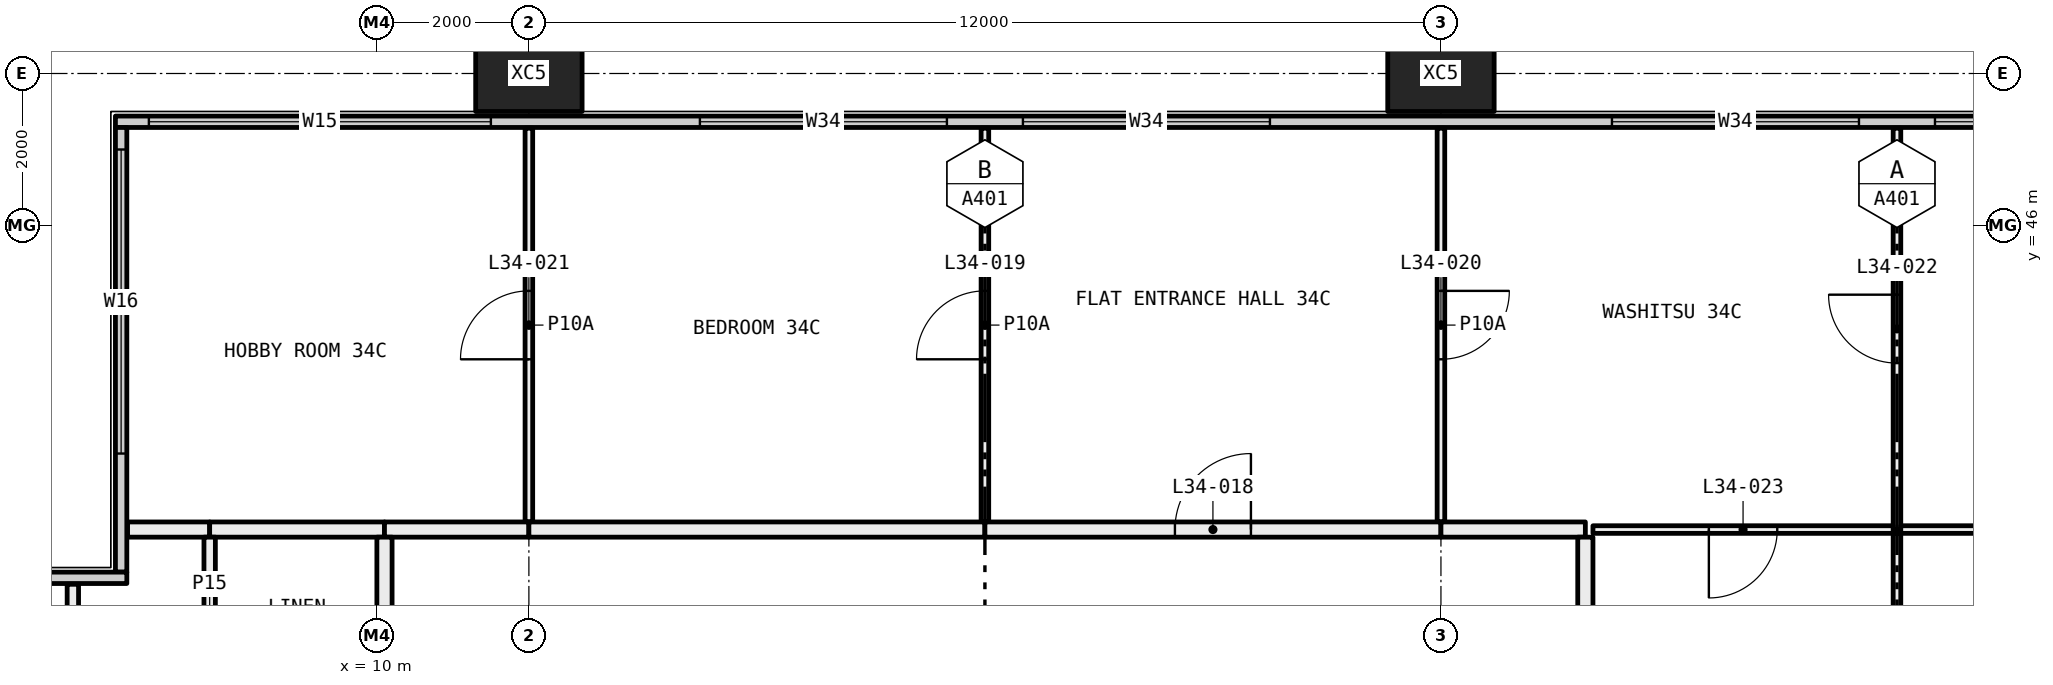
"""IFC4 building model, lengths in metres.
Left out: names, types, materials, properties, quantities, classifications, styles, units other than length and angle.
Written with IfcOpenShell. Run it as: python <this file> out.ifc"""

import sys

from ifc_helpers import new_model, si_unit, direction, frame, frame_2d, origin, origin_2d, place, context, subcontext, project, spatial, rectangle, hollow_rectangle, extrude, element, fill, save


model = new_model("IFC4")
c1 = context("Model", 3, precision=1e-05, world=origin(), true_north=direction((0.0, 1.0)))
c2 = subcontext(c1, "Body", "Model", "MODEL_VIEW")
j1 = project(units=[si_unit("LENGTHUNIT", "METRE"), si_unit("PLANEANGLEUNIT", "RADIAN")], contexts=[c1])
p1 = place(None, origin())
s1 = spatial("IfcSite", under=j1, at=p1, CompositionType="ELEMENT")
p2 = place(p1, origin())
s2 = spatial("IfcBuilding", under=s1, at=p2, CompositionType="ELEMENT")
p3 = place(p2, frame((0.0, 0.0, 131.1)))
s3 = spatial("IfcBuildingStorey", under=s2, at=p3, CompositionType="ELEMENT", Elevation=131.1)
for number, where, z_axis, x_axis in (
    (1, (12.0, 48.0, -0.4), (0.0, 0.0, 1.0), (1.0, 0.0, 0.0)),
    (2, (24.0, 48.0, -0.4), (0.0, 0.0, 1.0), (1.0, 0.0, 0.0)),
):
    element("IfcColumn", number, at=place(p3, frame(where, z_axis=z_axis, x_axis=x_axis)), inside=s3, PredefinedType="COLUMN", context=c2, shape_type="SweptSolid", body=[
        extrude(hollow_rectangle(XDim=1.4, YDim=1.0, WallThickness=0.055, at=origin_2d()), origin(), (0.0, 0.0, 1.0), 3.45),
    ])
p4 = place(p3, frame((6.56, 47.365, 0.0), z_axis=(0.0, 0.0, 1.0), x_axis=(1.0, 0.0, 0.0)))
e3 = element("IfcWall", 3, at=p4, inside=s3, PredefinedType="ELEMENTEDWALL", context=c2, shape_type="SweptSolid", body=[
    extrude(rectangle(XDim=58.88, YDim=0.15, at=frame_2d((29.44, 0.0))), origin(), (0.0, 0.0, 1.0), 3.05),
])
p5 = place(p4, frame((0.44, 0.0, 0.45)))
e4 = element("IfcOpeningElement", 4, at=p5, cuts=e3, PredefinedType="OPENING", context=c2, shape_type="SweptSolid", body=[
    extrude(rectangle(XDim=4.5, YDim=2.55, at=frame_2d((2.25, 1.275))), frame((0.0, 0.085, 0.0), z_axis=(0.0, -1.0, 0.0), x_axis=(1.0, 0.0, 0.0)), (0.0, 0.0, 1.0), 0.17),
])
p6 = place(p4, frame((7.69, 0.0, 0.45)))
e5 = element("IfcOpeningElement", 5, at=p6, cuts=e3, PredefinedType="OPENING", context=c2, shape_type="SweptSolid", body=[
    extrude(rectangle(XDim=3.25, YDim=2.55, at=frame_2d((1.625, 1.275))), frame((0.0, 0.085, 0.0), z_axis=(0.0, -1.0, 0.0), x_axis=(1.0, 0.0, 0.0)), (0.0, 0.0, 1.0), 0.17),
])
p7 = place(p4, frame((11.94, 0.0, 0.45)))
e6 = element("IfcOpeningElement", 6, at=p7, cuts=e3, PredefinedType="OPENING", context=c2, shape_type="SweptSolid", body=[
    extrude(rectangle(XDim=3.25, YDim=2.55, at=frame_2d((1.625, 1.275))), frame((0.0, 0.085, 0.0), z_axis=(0.0, -1.0, 0.0), x_axis=(1.0, 0.0, 0.0)), (0.0, 0.0, 1.0), 0.17),
])
p8 = place(p4, frame((19.69, 0.0, 0.45)))
e7 = element("IfcOpeningElement", 7, at=p8, cuts=e3, PredefinedType="OPENING", context=c2, shape_type="SweptSolid", body=[
    extrude(rectangle(XDim=3.25, YDim=2.55, at=frame_2d((1.625, 1.275))), frame((0.0, 0.085, 0.0), z_axis=(0.0, -1.0, 0.0), x_axis=(1.0, 0.0, 0.0)), (0.0, 0.0, 1.0), 0.17),
])
p9 = place(p4, frame((23.94, 0.0, 0.45)))
e8 = element("IfcOpeningElement", 8, at=p9, cuts=e3, PredefinedType="OPENING", context=c2, shape_type="SweptSolid", body=[
    extrude(rectangle(XDim=2.0, YDim=2.55, at=frame_2d((1.0, 1.275))), frame((0.0, 0.085, 0.0), z_axis=(0.0, -1.0, 0.0), x_axis=(1.0, 0.0, 0.0)), (0.0, 0.0, 1.0), 0.17),
])
p10 = place(p4, frame((31.69, 0.0, 0.45)))
e9 = element("IfcOpeningElement", 9, at=p10, cuts=e3, PredefinedType="OPENING", context=c2, shape_type="SweptSolid", body=[
    extrude(rectangle(XDim=3.25, YDim=2.55, at=frame_2d((1.625, 1.275))), frame((0.0, 0.085, 0.0), z_axis=(0.0, -1.0, 0.0), x_axis=(1.0, 0.0, 0.0)), (0.0, 0.0, 1.0), 0.17),
])
p11 = place(p4, frame((35.94, 0.0, 0.45)))
e10 = element("IfcOpeningElement", 10, at=p11, cuts=e3, PredefinedType="OPENING", context=c2, shape_type="SweptSolid", body=[
    extrude(rectangle(XDim=3.25, YDim=2.55, at=frame_2d((1.625, 1.275))), frame((0.0, 0.085, 0.0), z_axis=(0.0, -1.0, 0.0), x_axis=(1.0, 0.0, 0.0)), (0.0, 0.0, 1.0), 0.17),
])
p12 = place(p4, frame((43.69, 0.0, 0.45)))
e11 = element("IfcOpeningElement", 11, at=p12, cuts=e3, PredefinedType="OPENING", context=c2, shape_type="SweptSolid", body=[
    extrude(rectangle(XDim=3.25, YDim=2.55, at=frame_2d((1.625, 1.275))), frame((0.0, 0.085, 0.0), z_axis=(0.0, -1.0, 0.0), x_axis=(1.0, 0.0, 0.0)), (0.0, 0.0, 1.0), 0.17),
])
p13 = place(p4, frame((47.94, 0.0, 0.45)))
e12 = element("IfcOpeningElement", 12, at=p13, cuts=e3, PredefinedType="OPENING", context=c2, shape_type="SweptSolid", body=[
    extrude(rectangle(XDim=2.0, YDim=2.55, at=frame_2d((1.0, 1.275))), frame((0.0, 0.085, 0.0), z_axis=(0.0, -1.0, 0.0), x_axis=(1.0, 0.0, 0.0)), (0.0, 0.0, 1.0), 0.17),
])
p14 = place(p4, frame((53.94, 0.0, 0.45)))
e13 = element("IfcOpeningElement", 13, at=p14, cuts=e3, PredefinedType="OPENING", context=c2, shape_type="SweptSolid", body=[
    extrude(rectangle(XDim=4.5, YDim=2.55, at=frame_2d((2.25, 1.275))), frame((0.0, 0.085, 0.0), z_axis=(0.0, -1.0, 0.0), x_axis=(1.0, 0.0, 0.0)), (0.0, 0.0, 1.0), 0.17),
])
p15 = place(p3, frame((6.635, 41.44, 0.0), z_axis=(0.0, 0.0, 1.0), x_axis=(0.0, 1.0, 0.0)))
e14 = element("IfcWall", 14, at=p15, inside=s3, PredefinedType="ELEMENTEDWALL", context=c2, shape_type="SweptSolid", body=[
    extrude(rectangle(XDim=5.85, YDim=0.15, at=frame_2d((2.925, 0.0))), origin(), (0.0, 0.0, 1.0), 3.05),
])
p16 = place(p15, frame((1.56, 0.0, 0.45)))
e15 = element("IfcOpeningElement", 15, at=p16, cuts=e14, PredefinedType="OPENING", context=c2, shape_type="SweptSolid", body=[
    extrude(rectangle(XDim=4.0, YDim=2.55, at=frame_2d((2.0, 1.275))), frame((0.0, 0.085, 0.0), z_axis=(0.0, -1.0, 0.0), x_axis=(1.0, 0.0, 0.0)), (0.0, 0.0, 1.0), 0.17),
])
p17 = place(p3, frame((0.56, 41.365, 0.0), z_axis=(0.0, 0.0, 1.0), x_axis=(1.0, 0.0, 0.0)))
e16 = element("IfcWall", 16, at=p17, inside=s3, PredefinedType="ELEMENTEDWALL", context=c2, shape_type="SweptSolid", body=[
    extrude(rectangle(XDim=6.15, YDim=0.15, at=frame_2d((3.075, 0.0))), origin(), (0.0, 0.0, 1.0), 3.05),
])
p18 = place(p17, frame((0.44, 0.0, 0.45)))
e17 = element("IfcOpeningElement", 17, at=p18, cuts=e16, PredefinedType="OPENING", context=c2, shape_type="SweptSolid", body=[
    extrude(rectangle(XDim=4.0, YDim=2.55, at=frame_2d((2.0, 1.275))), frame((0.0, 0.085, 0.0), z_axis=(0.0, -1.0, 0.0), x_axis=(1.0, 0.0, 0.0)), (0.0, 0.0, 1.0), 0.17),
])
p19 = place(p3, frame((12.0, 42.1, 0.0), z_axis=(0.0, 0.0, 1.0), x_axis=(0.0, 1.0, 0.0)))
e18 = element("IfcWall", 18, at=p19, inside=s3, PredefinedType="PARTITIONING", context=c2, shape_type="SweptSolid", body=[
    extrude(rectangle(XDim=5.18, YDim=0.1, at=frame_2d((2.59, 0.0))), origin(), (0.0, 0.0, 1.0), 3.05),
])
p20 = place(p19, frame((2.14, 0.0, 0.0)))
e19 = element("IfcOpeningElement", 19, at=p20, cuts=e18, PredefinedType="OPENING", context=c2, shape_type="SweptSolid", body=[
    extrude(rectangle(XDim=0.9, YDim=2.1, at=frame_2d((0.45, 1.05))), frame((0.0, 0.06, 0.0), z_axis=(0.0, -1.0, 0.0), x_axis=(1.0, 0.0, 0.0)), (0.0, 0.0, 1.0), 0.12),
])
p21 = place(p3, frame((6.72, 42.0, 0.0), z_axis=(0.0, 0.0, 1.0), x_axis=(1.0, 0.0, 0.0)))
e20 = element("IfcWall", 20, at=p21, inside=s3, PredefinedType="PARTITIONING", context=c2, shape_type="SweptSolid", body=[
    extrude(rectangle(XDim=1.08, YDim=0.2, at=frame_2d((0.54, 0.0))), origin(), (0.0, 0.0, 1.0), 3.05),
])
p22 = place(p3, frame((7.8, 42.0, 0.0), z_axis=(0.0, 0.0, 1.0), x_axis=(1.0, 0.0, 0.0)))
e21 = element("IfcWall", 21, at=p22, inside=s3, PredefinedType="PARTITIONING", context=c2, shape_type="SweptSolid", body=[
    extrude(rectangle(XDim=2.3, YDim=0.2, at=frame_2d((1.15, 0.0))), origin(), (0.0, 0.0, 1.0), 3.05),
])
p23 = place(p3, frame((10.1, 42.0, 0.0), z_axis=(0.0, 0.0, 1.0), x_axis=(1.0, 0.0, 0.0)))
e22 = element("IfcWall", 22, at=p23, inside=s3, PredefinedType="PARTITIONING", context=c2, shape_type="SweptSolid", body=[
    extrude(rectangle(XDim=1.9, YDim=0.2, at=frame_2d((0.95, 0.0))), origin(), (0.0, 0.0, 1.0), 3.05),
])
p24 = place(p3, frame((18.0, 42.1, 0.0), z_axis=(0.0, 0.0, 1.0), x_axis=(0.0, 1.0, 0.0)))
e23 = element("IfcWall", 23, at=p24, inside=s3, PredefinedType="PARTITIONING", context=c2, shape_type="SweptSolid", body=[
    extrude(rectangle(XDim=5.18, YDim=0.1, at=frame_2d((2.59, 0.0))), origin(), (0.0, 0.0, 1.0), 3.05),
])
p25 = place(p24, frame((2.14, 0.0, 0.0)))
e24 = element("IfcOpeningElement", 24, at=p25, cuts=e23, PredefinedType="OPENING", context=c2, shape_type="SweptSolid", body=[
    extrude(rectangle(XDim=0.9, YDim=2.1, at=frame_2d((0.45, 1.05))), frame((0.0, 0.06, 0.0), z_axis=(0.0, -1.0, 0.0), x_axis=(1.0, 0.0, 0.0)), (0.0, 0.0, 1.0), 0.12),
])
p26 = place(p3, frame((12.0, 42.0, 0.0), z_axis=(0.0, 0.0, 1.0), x_axis=(1.0, 0.0, 0.0)))
e25 = element("IfcWall", 25, at=p26, inside=s3, PredefinedType="PARTITIONING", context=c2, shape_type="SweptSolid", body=[
    extrude(rectangle(XDim=6.0, YDim=0.2, at=frame_2d((3.0, 0.0))), origin(), (0.0, 0.0, 1.0), 3.05),
])
p27 = place(p3, frame((24.0, 42.1, 0.0), z_axis=(0.0, 0.0, 1.0), x_axis=(0.0, 1.0, 0.0)))
e26 = element("IfcWall", 26, at=p27, inside=s3, PredefinedType="PARTITIONING", context=c2, shape_type="SweptSolid", body=[
    extrude(rectangle(XDim=5.18, YDim=0.1, at=frame_2d((2.59, 0.0))), origin(), (0.0, 0.0, 1.0), 3.05),
])
p28 = place(p27, frame((2.14, 0.0, 0.0)))
e27 = element("IfcOpeningElement", 27, at=p28, cuts=e26, PredefinedType="OPENING", context=c2, shape_type="SweptSolid", body=[
    extrude(rectangle(XDim=0.9, YDim=2.1, at=frame_2d((0.45, 1.05))), frame((0.0, 0.06, 0.0), z_axis=(0.0, -1.0, 0.0), x_axis=(1.0, 0.0, 0.0)), (0.0, 0.0, 1.0), 0.12),
])
p29 = place(p3, frame((18.0, 42.0, 0.0), z_axis=(0.0, 0.0, 1.0), x_axis=(1.0, 0.0, 0.0)))
e28 = element("IfcWall", 28, at=p29, inside=s3, PredefinedType="PARTITIONING", context=c2, shape_type="SweptSolid", body=[
    extrude(rectangle(XDim=6.0, YDim=0.2, at=frame_2d((3.0, 0.0))), origin(), (0.0, 0.0, 1.0), 3.05),
])
p30 = place(p29, frame((2.5, 0.0, 0.0)))
e29 = element("IfcOpeningElement", 29, at=p30, cuts=e28, PredefinedType="OPENING", context=c2, shape_type="SweptSolid", body=[
    extrude(rectangle(XDim=1.0, YDim=2.1, at=frame_2d((0.5, 1.05))), frame((0.0, 0.11, 0.0), z_axis=(0.0, -1.0, 0.0), x_axis=(1.0, 0.0, 0.0)), (0.0, 0.0, 1.0), 0.22),
])
p31 = place(p3, frame((30.0, 42.0, 0.0), z_axis=(0.0, 0.0, 1.0), x_axis=(0.0, 1.0, 0.0)))
e30 = element("IfcWall", 30, at=p31, inside=s3, PredefinedType="PARTITIONING", context=c2, shape_type="SweptSolid", body=[
    extrude(rectangle(XDim=5.28, YDim=0.1, at=frame_2d((2.64, 0.0))), origin(), (0.0, 0.0, 1.0), 3.05),
])
p32 = place(p31, frame((2.19, 0.0, 0.0)))
e31 = element("IfcOpeningElement", 31, at=p32, cuts=e30, PredefinedType="OPENING", context=c2, shape_type="SweptSolid", body=[
    extrude(rectangle(XDim=0.9, YDim=2.1, at=frame_2d((0.45, 1.05))), frame((0.0, 0.06, 0.0), z_axis=(0.0, -1.0, 0.0), x_axis=(1.0, 0.0, 0.0)), (0.0, 0.0, 1.0), 0.12),
])
p33 = place(p3, frame((26.0, 42.0, 0.0), z_axis=(0.0, 0.0, 1.0), x_axis=(1.0, 0.0, 0.0)))
e32 = element("IfcWall", 32, at=p33, inside=s3, PredefinedType="PARTITIONING", context=c2, shape_type="SweptSolid", body=[
    extrude(rectangle(XDim=3.95, YDim=0.1, at=frame_2d((1.975, 0.0))), origin(), (0.0, 0.0, 1.0), 3.05),
])
p34 = place(p33, frame((1.525, 0.0, 0.0)))
e33 = element("IfcOpeningElement", 33, at=p34, cuts=e32, PredefinedType="OPENING", context=c2, shape_type="SweptSolid", body=[
    extrude(rectangle(XDim=0.9, YDim=2.1, at=frame_2d((0.45, 1.05))), frame((0.0, 0.06, 0.0), z_axis=(0.0, -1.0, 0.0), x_axis=(1.0, 0.0, 0.0)), (0.0, 0.0, 1.0), 0.12),
])
p35 = place(p3, frame((24.0, 42.0, 0.0), z_axis=(0.0, 0.0, 1.0), x_axis=(1.0, 0.0, 0.0)))
e34 = element("IfcWall", 34, at=p35, inside=s3, PredefinedType="PARTITIONING", context=c2, shape_type="SweptSolid", body=[
    extrude(rectangle(XDim=1.9, YDim=0.2, at=frame_2d((0.95, 0.0))), origin(), (0.0, 0.0, 1.0), 3.05),
])
p36 = place(p3, frame((30.05, 42.0, 0.0), z_axis=(0.0, 0.0, 1.0), x_axis=(1.0, 0.0, 0.0)))
e35 = element("IfcWall", 35, at=p36, inside=s3, PredefinedType="PARTITIONING", context=c2, shape_type="SweptSolid", body=[
    extrude(rectangle(XDim=4.45, YDim=0.1, at=frame_2d((2.225, 0.0))), origin(), (0.0, 0.0, 1.0), 3.05),
])
p37 = place(p3, frame((30.0, 36.1, 0.0), z_axis=(0.0, 0.0, 1.0), x_axis=(0.0, 1.0, 0.0)))
e36 = element("IfcWall", 36, at=p37, inside=s3, PredefinedType="PARTITIONING", context=c2, shape_type="SweptSolid", body=[
    extrude(rectangle(XDim=5.85, YDim=0.1, at=frame_2d((2.925, 0.0))), origin(), (0.0, 0.0, 1.0), 3.05),
])
p38 = place(p37, frame((2.475, 0.0, 0.0)))
e37 = element("IfcOpeningElement", 37, at=p38, cuts=e36, PredefinedType="OPENING", context=c2, shape_type="SweptSolid", body=[
    extrude(rectangle(XDim=0.9, YDim=2.1, at=frame_2d((0.45, 1.05))), frame((0.0, 0.06, 0.0), z_axis=(0.0, -1.0, 0.0), x_axis=(1.0, 0.0, 0.0)), (0.0, 0.0, 1.0), 0.12),
])
p39 = place(p3, frame((25.9, 41.9, 0.0), z_axis=(0.0, 0.0, 1.0), x_axis=(0.0, -1.0, 0.0)))
e38 = element("IfcWall", 38, at=p39, inside=s3, PredefinedType="PARTITIONING", context=c2, shape_type="SweptSolid", body=[
    extrude(rectangle(XDim=6.2, YDim=0.2, at=frame_2d((3.1, 0.0))), origin(), (0.0, 0.0, 1.0), 2.45),
])
p40 = place(p3, frame((6.0, 39.0, 0.0), z_axis=(0.0, 0.0, 1.0), x_axis=(0.0, 1.0, 0.0)))
e39 = element("IfcWall", 39, at=p40, inside=s3, PredefinedType="PARTITIONING", context=c2, shape_type="SweptSolid", body=[
    extrude(rectangle(XDim=2.28, YDim=0.15, at=frame_2d((1.14, 0.0))), origin(), (0.0, 0.0, 1.0), 3.05),
])
p41 = place(p40, frame((0.69, 0.0, 0.0)))
e40 = element("IfcOpeningElement", 40, at=p41, cuts=e39, PredefinedType="OPENING", context=c2, shape_type="SweptSolid", body=[
    extrude(rectangle(XDim=0.9, YDim=2.1, at=frame_2d((0.45, 1.05))), frame((0.0, 0.085, 0.0), z_axis=(0.0, -1.0, 0.0), x_axis=(1.0, 0.0, 0.0)), (0.0, 0.0, 1.0), 0.17),
])
p42 = place(p3, frame((7.8, 39.075, 0.0), z_axis=(0.0, 0.0, 1.0), x_axis=(0.0, 1.0, 0.0)))
e41 = element("IfcWall", 41, at=p42, inside=s3, PredefinedType="PARTITIONING", context=c2, shape_type="SweptSolid", body=[
    extrude(rectangle(XDim=2.825, YDim=0.15, at=frame_2d((1.413, 0.0))), origin(), (0.0, 0.0, 1.0), 3.05),
])
p43 = place(p3, frame((10.1, 39.0, 0.0), z_axis=(0.0, 0.0, 1.0), x_axis=(0.0, 1.0, 0.0)))
e42 = element("IfcWall", 42, at=p43, inside=s3, PredefinedType="PARTITIONING", context=c2, shape_type="SweptSolid", body=[
    extrude(rectangle(XDim=2.9, YDim=0.2, at=frame_2d((1.45, 0.0))), origin(), (0.0, 0.0, 1.0), 3.05),
])
p44 = place(p5, origin())
e43 = element("IfcWindow", 43, at=p44, inside=s3, PartitioningType="SINGLE_PANEL", PredefinedType="WINDOW", context=c2, shape_type="SweptSolid", body=[
    extrude(rectangle(XDim=4.5, YDim=2.55, at=frame_2d((2.25, 1.275))), frame((0.0, 0.03, 0.0), z_axis=(0.0, -1.0, 0.0), x_axis=(1.0, 0.0, 0.0)), (0.0, 0.0, 1.0), 0.06),
])
fill(e4, e43)
p45 = place(p6, origin())
e44 = element("IfcWindow", 44, at=p45, inside=s3, PartitioningType="SINGLE_PANEL", PredefinedType="WINDOW", context=c2, shape_type="SweptSolid", body=[
    extrude(rectangle(XDim=3.25, YDim=2.55, at=frame_2d((1.625, 1.275))), frame((0.0, 0.03, 0.0), z_axis=(0.0, -1.0, 0.0), x_axis=(1.0, 0.0, 0.0)), (0.0, 0.0, 1.0), 0.06),
])
fill(e5, e44)
p46 = place(p7, origin())
e45 = element("IfcWindow", 45, at=p46, inside=s3, PartitioningType="SINGLE_PANEL", PredefinedType="WINDOW", context=c2, shape_type="SweptSolid", body=[
    extrude(rectangle(XDim=3.25, YDim=2.55, at=frame_2d((1.625, 1.275))), frame((0.0, 0.03, 0.0), z_axis=(0.0, -1.0, 0.0), x_axis=(1.0, 0.0, 0.0)), (0.0, 0.0, 1.0), 0.06),
])
fill(e6, e45)
p47 = place(p8, origin())
e46 = element("IfcWindow", 46, at=p47, inside=s3, PartitioningType="SINGLE_PANEL", PredefinedType="WINDOW", context=c2, shape_type="SweptSolid", body=[
    extrude(rectangle(XDim=3.25, YDim=2.55, at=frame_2d((1.625, 1.275))), frame((0.0, 0.03, 0.0), z_axis=(0.0, -1.0, 0.0), x_axis=(1.0, 0.0, 0.0)), (0.0, 0.0, 1.0), 0.06),
])
fill(e7, e46)
p48 = place(p9, origin())
e47 = element("IfcWindow", 47, at=p48, inside=s3, PartitioningType="SINGLE_PANEL", PredefinedType="WINDOW", context=c2, shape_type="SweptSolid", body=[
    extrude(rectangle(XDim=2.0, YDim=2.55, at=frame_2d((1.0, 1.275))), frame((0.0, 0.03, 0.0), z_axis=(0.0, -1.0, 0.0), x_axis=(1.0, 0.0, 0.0)), (0.0, 0.0, 1.0), 0.06),
])
fill(e8, e47)
p49 = place(p16, origin())
e48 = element("IfcWindow", 48, at=p49, inside=s3, PartitioningType="SINGLE_PANEL", PredefinedType="WINDOW", context=c2, shape_type="SweptSolid", body=[
    extrude(rectangle(XDim=4.0, YDim=2.55, at=frame_2d((2.0, 1.275))), frame((0.0, 0.03, 0.0), z_axis=(0.0, -1.0, 0.0), x_axis=(1.0, 0.0, 0.0)), (0.0, 0.0, 1.0), 0.06),
])
fill(e15, e48)
p50 = place(p30, origin())
e49 = element("IfcDoor", 49, at=p50, inside=s3, OperationType="SINGLE_SWING_LEFT", PredefinedType="DOOR", context=c2, shape_type="SweptSolid", body=[
    extrude(rectangle(XDim=1.0, YDim=2.1, at=frame_2d((0.5, 1.05))), frame((0.0, 0.025, 0.0), z_axis=(0.0, -1.0, 0.0), x_axis=(1.0, 0.0, 0.0)), (0.0, 0.0, 1.0), 0.05),
])
fill(e29, e49)
p51 = place(p25, origin())
e50 = element("IfcDoor", 50, at=p51, inside=s3, OperationType="SINGLE_SWING_RIGHT", PredefinedType="DOOR", context=c2, shape_type="SweptSolid", body=[
    extrude(rectangle(XDim=0.9, YDim=2.1, at=frame_2d((0.45, 1.05))), frame((0.0, 0.025, 0.0), z_axis=(0.0, -1.0, 0.0), x_axis=(1.0, 0.0, 0.0)), (0.0, 0.0, 1.0), 0.05),
])
fill(e24, e50)
p52 = place(p28, frame((0.9, 0.0, 0.0), x_axis=(-1.0, 0.0, 0.0)))
e51 = element("IfcDoor", 51, at=p52, inside=s3, OperationType="SINGLE_SWING_RIGHT", PredefinedType="DOOR", context=c2, shape_type="SweptSolid", body=[
    extrude(rectangle(XDim=0.9, YDim=2.1, at=frame_2d((0.45, 1.05))), frame((0.0, 0.025, 0.0), z_axis=(0.0, -1.0, 0.0), x_axis=(1.0, 0.0, 0.0)), (0.0, 0.0, 1.0), 0.05),
])
fill(e27, e51)
p53 = place(p20, origin())
e52 = element("IfcDoor", 52, at=p53, inside=s3, OperationType="SINGLE_SWING_RIGHT", PredefinedType="DOOR", context=c2, shape_type="SweptSolid", body=[
    extrude(rectangle(XDim=0.9, YDim=2.1, at=frame_2d((0.45, 1.05))), frame((0.0, 0.025, 0.0), z_axis=(0.0, -1.0, 0.0), x_axis=(1.0, 0.0, 0.0)), (0.0, 0.0, 1.0), 0.05),
])
fill(e19, e52)
p54 = place(p32, origin())
e53 = element("IfcDoor", 53, at=p54, inside=s3, OperationType="SINGLE_SWING_LEFT", PredefinedType="DOOR", context=c2, shape_type="SweptSolid", body=[
    extrude(rectangle(XDim=0.9, YDim=2.1, at=frame_2d((0.45, 1.05))), frame((0.0, 0.025, 0.0), z_axis=(0.0, -1.0, 0.0), x_axis=(1.0, 0.0, 0.0)), (0.0, 0.0, 1.0), 0.05),
])
fill(e31, e53)
p55 = place(p34, frame((0.9, 0.0, 0.0), x_axis=(-1.0, 0.0, 0.0)))
e54 = element("IfcDoor", 54, at=p55, inside=s3, OperationType="SINGLE_SWING_LEFT", PredefinedType="DOOR", context=c2, shape_type="SweptSolid", body=[
    extrude(rectangle(XDim=0.9, YDim=2.1, at=frame_2d((0.45, 1.05))), frame((0.0, 0.025, 0.0), z_axis=(0.0, -1.0, 0.0), x_axis=(1.0, 0.0, 0.0)), (0.0, 0.0, 1.0), 0.05),
])
fill(e33, e54)
save(model, sys.argv[1])
